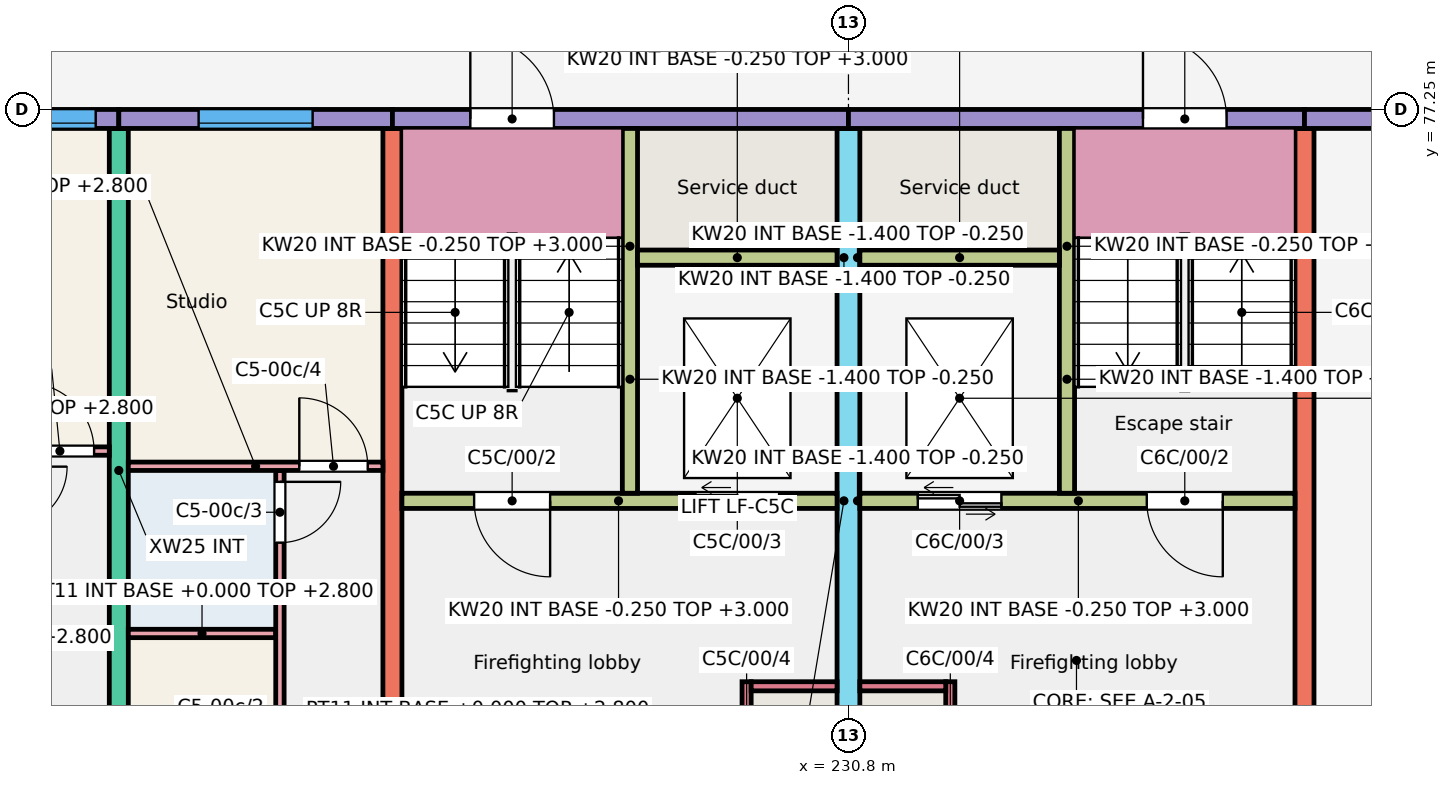
"""IFC4 building model, lengths in metres.
Left out: names, types, materials, properties, quantities, classifications, styles, units other than length and angle.
Written with IfcOpenShell. Run it as: python <this file> out.ifc"""

import sys

from ifc_helpers import new_model, si_unit, direction, frame, frame_2d, origin, place, context, subcontext, project, spatial, rectangle, extrude, element, fill, save


model = new_model("IFC4")
c1 = context("Model", 3, precision=1e-05, world=origin(), true_north=direction((0.0, 1.0)))
c2 = subcontext(c1, "Body", "Model", "MODEL_VIEW")
j1 = project(units=[si_unit("LENGTHUNIT", "METRE"), si_unit("PLANEANGLEUNIT", "RADIAN")], contexts=[c1])
p1 = place(None, origin())
s1 = spatial("IfcSite", under=j1, at=p1, CompositionType="ELEMENT")
p2 = place(p1, origin())
s2 = spatial("IfcBuilding", under=s1, at=p2, CompositionType="ELEMENT")
p3 = place(p2, origin())
s3 = spatial("IfcBuildingStorey", under=s2, at=p3, CompositionType="ELEMENT", Elevation=0.0)
for number, where, z_axis, x_axis in (
    (1, (221.2, 68.0, -0.25), (0.0, 0.0, 1.0), (0.0, 1.0, 0.0)),
    (2, (224.8, 68.0, -0.25), (0.0, 0.0, 1.0), (0.0, 1.0, 0.0)),
):
    element("IfcWall", number, at=place(p3, frame(where, z_axis=z_axis, x_axis=x_axis)), inside=s3, PredefinedType="SHEAR", context=c2, shape_type="SweptSolid", body=[
        extrude(rectangle(XDim=9.0, YDim=0.25, at=frame_2d((4.5, 0.0))), origin(), (0.0, 0.0, 1.0), 3.25),
    ])
p4 = place(p3, frame((230.8, 66.0, -0.25), z_axis=(0.0, 0.0, 1.0), x_axis=(0.0, 1.0, 0.0)))
e3 = element("IfcWall", 3, at=p4, inside=s3, PredefinedType="SHEAR", context=c2, shape_type="SweptSolid", body=[
    extrude(rectangle(XDim=11.0, YDim=0.3, at=frame_2d((5.5, 0.0))), origin(), (0.0, 0.0, 1.0), 3.25),
])
p5 = place(p4, frame((0.3, 0.0, 0.25)))
e4 = element("IfcOpeningElement", 4, at=p5, cuts=e3, PredefinedType="OPENING", context=c2, shape_type="SweptSolid", body=[
    extrude(rectangle(XDim=1.2, YDim=2.1, at=frame_2d((0.6, 1.05))), frame((0.0, 0.16, 0.0), z_axis=(0.0, -1.0, 0.0), x_axis=(1.0, 0.0, 0.0)), (0.0, 0.0, 1.0), 0.32),
])
p6 = place(p3, frame((236.8, 68.0, -0.25), z_axis=(0.0, 0.0, 1.0), x_axis=(0.0, 1.0, 0.0)))
e5 = element("IfcWall", 5, at=p6, inside=s3, PredefinedType="SHEAR", context=c2, shape_type="SweptSolid", body=[
    extrude(rectangle(XDim=9.0, YDim=0.25, at=frame_2d((4.5, 0.0))), origin(), (0.0, 0.0, 1.0), 3.25),
])
p7 = place(p3, frame((217.6, 77.125, -0.25), z_axis=(0.0, 0.0, 1.0), x_axis=(1.0, 0.0, 0.0)))
e6 = element("IfcWall", 6, at=p7, inside=s3, PredefinedType="SOLIDWALL", context=c2, shape_type="SweptSolid", body=[
    extrude(rectangle(XDim=3.6, YDim=0.25, at=frame_2d((1.8, 0.0))), origin(), (0.0, 0.0, 1.0), 3.25),
])
p8 = place(p7, frame((1.796, 0.0, 1.15)))
e7 = element("IfcOpeningElement", 7, at=p8, cuts=e6, PredefinedType="OPENING", context=c2, shape_type="SweptSolid", body=[
    extrude(rectangle(XDim=1.5, YDim=1.5, at=frame_2d((0.75, 0.75))), frame((0.0, 0.135, 0.0), z_axis=(0.0, -1.0, 0.0), x_axis=(1.0, 0.0, 0.0)), (0.0, 0.0, 1.0), 0.27),
])
p9 = place(p7, frame((0.517, 0.0, 0.25)))
e8 = element("IfcOpeningElement", 8, at=p9, cuts=e6, PredefinedType="OPENING", context=c2, shape_type="SweptSolid", body=[
    extrude(rectangle(XDim=1.0, YDim=2.1, at=frame_2d((0.5, 1.05))), frame((0.0, 0.135, 0.0), z_axis=(0.0, -1.0, 0.0), x_axis=(1.0, 0.0, 0.0)), (0.0, 0.0, 1.0), 0.27),
])
p10 = place(p3, frame((221.2, 77.125, -0.25), z_axis=(0.0, 0.0, 1.0), x_axis=(1.0, 0.0, 0.0)))
e9 = element("IfcWall", 9, at=p10, inside=s3, PredefinedType="SOLIDWALL", context=c2, shape_type="SweptSolid", body=[
    extrude(rectangle(XDim=3.6, YDim=0.25, at=frame_2d((1.8, 0.0))), origin(), (0.0, 0.0, 1.0), 3.25),
])
p11 = place(p10, frame((1.05, 0.0, 1.15)))
e10 = element("IfcOpeningElement", 10, at=p11, cuts=e9, PredefinedType="OPENING", context=c2, shape_type="SweptSolid", body=[
    extrude(rectangle(XDim=1.5, YDim=1.5, at=frame_2d((0.75, 0.75))), frame((0.0, 0.135, 0.0), z_axis=(0.0, -1.0, 0.0), x_axis=(1.0, 0.0, 0.0)), (0.0, 0.0, 1.0), 0.27),
])
p12 = place(p3, frame((224.8, 77.125, -0.25), z_axis=(0.0, 0.0, 1.0), x_axis=(1.0, 0.0, 0.0)))
e11 = element("IfcWall", 11, at=p12, inside=s3, PredefinedType="SOLIDWALL", context=c2, shape_type="SweptSolid", body=[
    extrude(rectangle(XDim=6.0, YDim=0.25, at=frame_2d((3.0, 0.0))), origin(), (0.0, 0.0, 1.0), 3.25),
])
p13 = place(p12, frame((1.025, 0.0, 0.25)))
e12 = element("IfcOpeningElement", 12, at=p13, cuts=e11, PredefinedType="OPENING", context=c2, shape_type="SweptSolid", body=[
    extrude(rectangle(XDim=1.1, YDim=2.1, at=frame_2d((0.55, 1.05))), frame((0.0, 0.135, 0.0), z_axis=(0.0, -1.0, 0.0), x_axis=(1.0, 0.0, 0.0)), (0.0, 0.0, 1.0), 0.27),
])
p14 = place(p3, frame((224.925, 72.1, -0.25), z_axis=(0.0, 0.0, 1.0), x_axis=(1.0, 0.0, 0.0)))
e13 = element("IfcWall", 13, at=p14, inside=s3, PredefinedType="SHEAR", context=c2, shape_type="SweptSolid", body=[
    extrude(rectangle(XDim=5.725, YDim=0.2, at=frame_2d((2.862, 0.0))), origin(), (0.0, 0.0, 1.0), 3.25),
])
p15 = place(p14, frame((0.95, 0.0, 0.25)))
e14 = element("IfcOpeningElement", 14, at=p15, cuts=e13, PredefinedType="OPENING", context=c2, shape_type="SweptSolid", body=[
    extrude(rectangle(XDim=1.0, YDim=2.1, at=frame_2d((0.5, 1.05))), frame((0.0, 0.11, 0.0), z_axis=(0.0, -1.0, 0.0), x_axis=(1.0, 0.0, 0.0)), (0.0, 0.0, 1.0), 0.22),
])
p16 = place(p14, frame((3.863, 0.0, 0.25)))
e15 = element("IfcOpeningElement", 15, at=p16, cuts=e13, PredefinedType="OPENING", context=c2, shape_type="SweptSolid", body=[
    extrude(rectangle(XDim=1.1, YDim=2.1, at=frame_2d((0.55, 1.05))), frame((0.0, 0.11, 0.0), z_axis=(0.0, -1.0, 0.0), x_axis=(1.0, 0.0, 0.0)), (0.0, 0.0, 1.0), 0.22),
])
p17 = place(p3, frame((227.925, 72.2, -0.25), z_axis=(0.0, 0.0, 1.0), x_axis=(0.0, 1.0, 0.0)))
e16 = element("IfcWall", 16, at=p17, inside=s3, PredefinedType="SHEAR", context=c2, shape_type="SweptSolid", body=[
    extrude(rectangle(XDim=4.8, YDim=0.2, at=frame_2d((2.4, 0.0))), origin(), (0.0, 0.0, 1.0), 3.25),
])
p18 = place(p3, frame((228.025, 75.3, -0.25), z_axis=(0.0, 0.0, 1.0), x_axis=(1.0, 0.0, 0.0)))
e17 = element("IfcWall", 17, at=p18, inside=s3, PredefinedType="SHEAR", context=c2, shape_type="SweptSolid", body=[
    extrude(rectangle(XDim=2.625, YDim=0.2, at=frame_2d((1.312, 0.0))), origin(), (0.0, 0.0, 1.0), 3.25),
])
p19 = place(p3, frame((229.46, 68.0, -0.25), z_axis=(0.0, 0.0, 1.0), x_axis=(0.0, 1.0, 0.0)))
e18 = element("IfcWall", 18, at=p19, inside=s3, PredefinedType="SHEAR", context=c2, shape_type="SweptSolid", body=[
    extrude(rectangle(XDim=1.72, YDim=0.12, at=frame_2d((0.86, 0.0))), origin(), (0.0, 0.0, 1.0), 3.25),
])
p20 = place(p19, frame((0.45, 0.0, 0.25)))
e19 = element("IfcOpeningElement", 19, at=p20, cuts=e18, PredefinedType="OPENING", context=c2, shape_type="SweptSolid", body=[
    extrude(rectangle(XDim=0.9, YDim=2.1, at=frame_2d((0.45, 1.05))), frame((0.0, 0.07, 0.0), z_axis=(0.0, -1.0, 0.0), x_axis=(1.0, 0.0, 0.0)), (0.0, 0.0, 1.0), 0.14),
])
p21 = place(p3, frame((229.52, 69.66, -0.25), z_axis=(0.0, 0.0, 1.0), x_axis=(1.0, 0.0, 0.0)))
e20 = element("IfcWall", 20, at=p21, inside=s3, PredefinedType="SHEAR", context=c2, shape_type="SweptSolid", body=[
    extrude(rectangle(XDim=1.13, YDim=0.12, at=frame_2d((0.565, 0.0))), origin(), (0.0, 0.0, 1.0), 3.25),
])
p22 = place(p3, frame((230.8, 77.125, -0.25), z_axis=(0.0, 0.0, 1.0), x_axis=(1.0, 0.0, 0.0)))
e21 = element("IfcWall", 21, at=p22, inside=s3, PredefinedType="SOLIDWALL", context=c2, shape_type="SweptSolid", body=[
    extrude(rectangle(XDim=6.0, YDim=0.25, at=frame_2d((3.0, 0.0))), origin(), (0.0, 0.0, 1.0), 3.25),
])
p23 = place(p22, frame((3.875, 0.0, 0.25)))
e22 = element("IfcOpeningElement", 22, at=p23, cuts=e21, PredefinedType="OPENING", context=c2, shape_type="SweptSolid", body=[
    extrude(rectangle(XDim=1.1, YDim=2.1, at=frame_2d((0.55, 1.05))), frame((0.0, 0.135, 0.0), z_axis=(0.0, -1.0, 0.0), x_axis=(1.0, 0.0, 0.0)), (0.0, 0.0, 1.0), 0.27),
])
p24 = place(p3, frame((230.95, 72.1, -0.25), z_axis=(0.0, 0.0, 1.0), x_axis=(1.0, 0.0, 0.0)))
e23 = element("IfcWall", 23, at=p24, inside=s3, PredefinedType="SHEAR", context=c2, shape_type="SweptSolid", body=[
    extrude(rectangle(XDim=5.725, YDim=0.2, at=frame_2d((2.863, 0.0))), origin(), (0.0, 0.0, 1.0), 3.25),
])
p25 = place(p24, frame((3.775, 0.0, 0.25)))
e24 = element("IfcOpeningElement", 24, at=p25, cuts=e23, PredefinedType="OPENING", context=c2, shape_type="SweptSolid", body=[
    extrude(rectangle(XDim=1.0, YDim=2.1, at=frame_2d((0.5, 1.05))), frame((0.0, 0.11, 0.0), z_axis=(0.0, -1.0, 0.0), x_axis=(1.0, 0.0, 0.0)), (0.0, 0.0, 1.0), 0.22),
])
p26 = place(p24, frame((0.762, 0.0, 0.25)))
e25 = element("IfcOpeningElement", 25, at=p26, cuts=e23, PredefinedType="OPENING", context=c2, shape_type="SweptSolid", body=[
    extrude(rectangle(XDim=1.1, YDim=2.1, at=frame_2d((0.55, 1.05))), frame((0.0, 0.11, 0.0), z_axis=(0.0, -1.0, 0.0), x_axis=(1.0, 0.0, 0.0)), (0.0, 0.0, 1.0), 0.22),
])
p27 = place(p3, frame((233.675, 72.2, -0.25), z_axis=(0.0, 0.0, 1.0), x_axis=(0.0, 1.0, 0.0)))
e26 = element("IfcWall", 26, at=p27, inside=s3, PredefinedType="SHEAR", context=c2, shape_type="SweptSolid", body=[
    extrude(rectangle(XDim=4.8, YDim=0.2, at=frame_2d((2.4, 0.0))), origin(), (0.0, 0.0, 1.0), 3.25),
])
p28 = place(p3, frame((230.95, 75.3, -0.25), z_axis=(0.0, 0.0, 1.0), x_axis=(1.0, 0.0, 0.0)))
e27 = element("IfcWall", 27, at=p28, inside=s3, PredefinedType="SHEAR", context=c2, shape_type="SweptSolid", body=[
    extrude(rectangle(XDim=2.625, YDim=0.2, at=frame_2d((1.312, 0.0))), origin(), (0.0, 0.0, 1.0), 3.25),
])
p29 = place(p3, frame((232.14, 68.0, -0.25), z_axis=(0.0, 0.0, 1.0), x_axis=(0.0, 1.0, 0.0)))
e28 = element("IfcWall", 28, at=p29, inside=s3, PredefinedType="SHEAR", context=c2, shape_type="SweptSolid", body=[
    extrude(rectangle(XDim=1.72, YDim=0.12, at=frame_2d((0.86, 0.0))), origin(), (0.0, 0.0, 1.0), 3.25),
])
p30 = place(p29, frame((0.45, 0.0, 0.25)))
e29 = element("IfcOpeningElement", 29, at=p30, cuts=e28, PredefinedType="OPENING", context=c2, shape_type="SweptSolid", body=[
    extrude(rectangle(XDim=0.9, YDim=2.1, at=frame_2d((0.45, 1.05))), frame((0.0, 0.07, 0.0), z_axis=(0.0, -1.0, 0.0), x_axis=(1.0, 0.0, 0.0)), (0.0, 0.0, 1.0), 0.14),
])
p31 = place(p3, frame((230.95, 69.66, -0.25), z_axis=(0.0, 0.0, 1.0), x_axis=(1.0, 0.0, 0.0)))
e30 = element("IfcWall", 30, at=p31, inside=s3, PredefinedType="SHEAR", context=c2, shape_type="SweptSolid", body=[
    extrude(rectangle(XDim=1.13, YDim=0.12, at=frame_2d((0.565, 0.0))), origin(), (0.0, 0.0, 1.0), 3.25),
])
p32 = place(p3, frame((236.8, 77.125, -0.25), z_axis=(0.0, 0.0, 1.0), x_axis=(1.0, 0.0, 0.0)))
e31 = element("IfcWall", 31, at=p32, inside=s3, PredefinedType="SOLIDWALL", context=c2, shape_type="SweptSolid", body=[
    extrude(rectangle(XDim=3.6, YDim=0.25, at=frame_2d((1.8, 0.0))), origin(), (0.0, 0.0, 1.0), 3.25),
])
p33 = place(p32, frame((1.3, 0.0, 0.25)))
e32 = element("IfcOpeningElement", 32, at=p33, cuts=e31, PredefinedType="OPENING", context=c2, shape_type="SweptSolid", body=[
    extrude(rectangle(XDim=1.0, YDim=2.1, at=frame_2d((0.5, 1.05))), frame((0.0, 0.135, 0.0), z_axis=(0.0, -1.0, 0.0), x_axis=(1.0, 0.0, 0.0)), (0.0, 0.0, 1.0), 0.27),
])
for number, where, z_axis, x_axis in (
    (33, (227.825, 72.1, -1.4), (0.0, 0.0, 1.0), (1.0, 0.0, 0.0)),
    (34, (227.825, 75.3, -1.4), (0.0, 0.0, 1.0), (1.0, 0.0, 0.0)),
):
    element("IfcWall", number, at=place(p3, frame(where, z_axis=z_axis, x_axis=x_axis)), inside=s3, PredefinedType="SHEAR", context=c2, shape_type="SweptSolid", body=[
        extrude(rectangle(XDim=2.975, YDim=0.2, at=frame_2d((1.488, 0.0))), origin(), (0.0, 0.0, 1.0), 1.15),
    ])
p34 = place(p3, frame((227.925, 72.2, -1.4), z_axis=(0.0, 0.0, 1.0), x_axis=(0.0, 1.0, 0.0)))
e35 = element("IfcWall", 35, at=p34, inside=s3, PredefinedType="SHEAR", context=c2, shape_type="SweptSolid", body=[
    extrude(rectangle(XDim=3.0, YDim=0.2, at=frame_2d((1.5, 0.0))), origin(), (0.0, 0.0, 1.0), 1.15),
])
p35 = place(p3, frame((230.725, 72.2, -1.4), z_axis=(0.0, 0.0, 1.0), x_axis=(0.0, 1.0, 0.0)))
e36 = element("IfcWall", 36, at=p35, inside=s3, PredefinedType="SHEAR", context=c2, shape_type="SweptSolid", body=[
    extrude(rectangle(XDim=3.0, YDim=0.15, at=frame_2d((1.5, 0.0))), origin(), (0.0, 0.0, 1.0), 1.15),
])
for number, where, z_axis, x_axis in (
    (37, (230.8, 72.1, -1.4), (0.0, 0.0, 1.0), (1.0, 0.0, 0.0)),
    (38, (230.8, 75.3, -1.4), (0.0, 0.0, 1.0), (1.0, 0.0, 0.0)),
):
    element("IfcWall", number, at=place(p3, frame(where, z_axis=z_axis, x_axis=x_axis)), inside=s3, PredefinedType="SHEAR", context=c2, shape_type="SweptSolid", body=[
        extrude(rectangle(XDim=2.975, YDim=0.2, at=frame_2d((1.487, 0.0))), origin(), (0.0, 0.0, 1.0), 1.15),
    ])
p36 = place(p3, frame((233.675, 72.2, -1.4), z_axis=(0.0, 0.0, 1.0), x_axis=(0.0, 1.0, 0.0)))
e39 = element("IfcWall", 39, at=p36, inside=s3, PredefinedType="SHEAR", context=c2, shape_type="SweptSolid", body=[
    extrude(rectangle(XDim=3.0, YDim=0.2, at=frame_2d((1.5, 0.0))), origin(), (0.0, 0.0, 1.0), 1.15),
])
p37 = place(p3, frame((230.875, 72.2, -1.4), z_axis=(0.0, 0.0, 1.0), x_axis=(0.0, 1.0, 0.0)))
e40 = element("IfcWall", 40, at=p37, inside=s3, PredefinedType="SHEAR", context=c2, shape_type="SweptSolid", body=[
    extrude(rectangle(XDim=3.0, YDim=0.15, at=frame_2d((1.5, 0.0))), origin(), (0.0, 0.0, 1.0), 1.15),
])
p38 = place(p3, frame((217.725, 72.755, 0.0), z_axis=(0.0, 0.0, 1.0), x_axis=(1.0, 0.0, 0.0)))
e41 = element("IfcWall", 41, at=p38, inside=s3, PredefinedType="PARTITIONING", context=c2, shape_type="SweptSolid", body=[
    extrude(rectangle(XDim=3.35, YDim=0.11, at=frame_2d((1.675, 0.0))), origin(), (0.0, 0.0, 1.0), 2.8),
])
p39 = place(p38, frame((2.25, 0.0, 0.0)))
e42 = element("IfcOpeningElement", 42, at=p39, cuts=e41, PredefinedType="OPENING", context=c2, shape_type="SweptSolid", body=[
    extrude(rectangle(XDim=0.9, YDim=2.1, at=frame_2d((0.45, 1.05))), frame((0.0, 0.065, 0.0), z_axis=(0.0, -1.0, 0.0), x_axis=(1.0, 0.0, 0.0)), (0.0, 0.0, 1.0), 0.13),
])
p40 = place(p3, frame((221.325, 70.355, 0.0), z_axis=(0.0, 0.0, 1.0), x_axis=(1.0, 0.0, 0.0)))
e43 = element("IfcWall", 43, at=p40, inside=s3, PredefinedType="PARTITIONING", context=c2, shape_type="SweptSolid", body=[
    extrude(rectangle(XDim=1.94, YDim=0.11, at=frame_2d((0.97, 0.0))), origin(), (0.0, 0.0, 1.0), 2.8),
])
p41 = place(p3, frame((223.32, 68.0, 0.0), z_axis=(0.0, 0.0, 1.0), x_axis=(0.0, 1.0, 0.0)))
e44 = element("IfcWall", 44, at=p41, inside=s3, PredefinedType="PARTITIONING", context=c2, shape_type="SweptSolid", body=[
    extrude(rectangle(XDim=4.5, YDim=0.11, at=frame_2d((2.25, 0.0))), origin(), (0.0, 0.0, 1.0), 2.8),
])
p42 = place(p41, frame((0.2, 0.0, 0.0)))
e45 = element("IfcOpeningElement", 45, at=p42, cuts=e44, PredefinedType="OPENING", context=c2, shape_type="SweptSolid", body=[
    extrude(rectangle(XDim=0.8, YDim=2.1, at=frame_2d((0.4, 1.05))), frame((0.0, 0.065, 0.0), z_axis=(0.0, -1.0, 0.0), x_axis=(1.0, 0.0, 0.0)), (0.0, 0.0, 1.0), 0.13),
])
p43 = place(p41, frame((3.55, 0.0, 0.0)))
e46 = element("IfcOpeningElement", 46, at=p43, cuts=e44, PredefinedType="OPENING", context=c2, shape_type="SweptSolid", body=[
    extrude(rectangle(XDim=0.8, YDim=2.1, at=frame_2d((0.4, 1.05))), frame((0.0, 0.065, 0.0), z_axis=(0.0, -1.0, 0.0), x_axis=(1.0, 0.0, 0.0)), (0.0, 0.0, 1.0), 0.13),
])
p44 = place(p3, frame((221.325, 72.555, 0.0), z_axis=(0.0, 0.0, 1.0), x_axis=(1.0, 0.0, 0.0)))
e47 = element("IfcWall", 47, at=p44, inside=s3, PredefinedType="PARTITIONING", context=c2, shape_type="SweptSolid", body=[
    extrude(rectangle(XDim=3.35, YDim=0.11, at=frame_2d((1.675, 0.0))), origin(), (0.0, 0.0, 1.0), 2.8),
])
p45 = place(p44, frame((2.25, 0.0, 0.0)))
e48 = element("IfcOpeningElement", 48, at=p45, cuts=e47, PredefinedType="OPENING", context=c2, shape_type="SweptSolid", body=[
    extrude(rectangle(XDim=0.9, YDim=2.1, at=frame_2d((0.45, 1.05))), frame((0.0, 0.065, 0.0), z_axis=(0.0, -1.0, 0.0), x_axis=(1.0, 0.0, 0.0)), (0.0, 0.0, 1.0), 0.13),
])
p46 = place(p8, origin())
e49 = element("IfcWindow", 49, at=p46, inside=s3, PartitioningType="SINGLE_PANEL", PredefinedType="WINDOW", context=c2, shape_type="SweptSolid", body=[
    extrude(rectangle(XDim=1.5, YDim=1.5, at=frame_2d((0.75, 0.75))), frame((0.0, -0.025, 0.0), z_axis=(0.0, -1.0, 0.0), x_axis=(1.0, 0.0, 0.0)), (0.0, 0.0, 1.0), 0.06),
])
fill(e7, e49)
p47 = place(p11, origin())
e50 = element("IfcWindow", 50, at=p47, inside=s3, PartitioningType="SINGLE_PANEL", PredefinedType="WINDOW", context=c2, shape_type="SweptSolid", body=[
    extrude(rectangle(XDim=1.5, YDim=1.5, at=frame_2d((0.75, 0.75))), frame((0.0, -0.025, 0.0), z_axis=(0.0, -1.0, 0.0), x_axis=(1.0, 0.0, 0.0)), (0.0, 0.0, 1.0), 0.06),
])
fill(e10, e50)
p48 = place(p39, origin())
e51 = element("IfcDoor", 51, at=p48, inside=s3, OperationType="SINGLE_SWING_LEFT", PredefinedType="DOOR", context=c2, shape_type="SweptSolid", body=[
    extrude(rectangle(XDim=0.9, YDim=2.1, at=frame_2d((0.45, 1.05))), frame((0.0, 0.025, 0.0), z_axis=(0.0, -1.0, 0.0), x_axis=(1.0, 0.0, 0.0)), (0.0, 0.0, 1.0), 0.05),
])
fill(e42, e51)
p49 = place(p43, origin())
e52 = element("IfcDoor", 52, at=p49, inside=s3, OperationType="SINGLE_SWING_RIGHT", PredefinedType="DOOR", context=c2, shape_type="SweptSolid", body=[
    extrude(rectangle(XDim=0.8, YDim=2.1, at=frame_2d((0.4, 1.05))), frame((0.0, 0.025, 0.0), z_axis=(0.0, -1.0, 0.0), x_axis=(1.0, 0.0, 0.0)), (0.0, 0.0, 1.0), 0.05),
])
fill(e46, e52)
p50 = place(p45, origin())
e53 = element("IfcDoor", 53, at=p50, inside=s3, OperationType="SINGLE_SWING_LEFT", PredefinedType="DOOR", context=c2, shape_type="SweptSolid", body=[
    extrude(rectangle(XDim=0.9, YDim=2.1, at=frame_2d((0.45, 1.05))), frame((0.0, 0.025, 0.0), z_axis=(0.0, -1.0, 0.0), x_axis=(1.0, 0.0, 0.0)), (0.0, 0.0, 1.0), 0.05),
])
fill(e48, e53)
p51 = place(p15, origin())
e54 = element("IfcDoor", 54, at=p51, inside=s3, OperationType="SINGLE_SWING_RIGHT", PredefinedType="DOOR", context=c2, shape_type="SweptSolid", body=[
    extrude(rectangle(XDim=1.0, YDim=2.1, at=frame_2d((0.5, 1.05))), frame((0.0, 0.025, 0.0), z_axis=(0.0, -1.0, 0.0), x_axis=(1.0, 0.0, 0.0)), (0.0, 0.0, 1.0), 0.05),
])
fill(e14, e54)
p52 = place(p16, origin())
e55 = element("IfcDoor", 55, at=p52, inside=s3, OperationType="DOUBLE_DOOR_SLIDING", PredefinedType="DOOR", context=c2, shape_type="SweptSolid", body=[
    extrude(rectangle(XDim=1.1, YDim=2.1, at=frame_2d((0.55, 1.05))), frame((0.0, 0.025, 0.0), z_axis=(0.0, -1.0, 0.0), x_axis=(1.0, 0.0, 0.0)), (0.0, 0.0, 1.0), 0.05),
])
fill(e15, e55)
p53 = place(p13, origin())
e56 = element("IfcDoor", 56, at=p53, inside=s3, OperationType="SINGLE_SWING_LEFT", PredefinedType="DOOR", context=c2, shape_type="SweptSolid", body=[
    extrude(rectangle(XDim=1.1, YDim=2.1, at=frame_2d((0.55, 1.05))), frame((0.0, 0.025, 0.0), z_axis=(0.0, -1.0, 0.0), x_axis=(1.0, 0.0, 0.0)), (0.0, 0.0, 1.0), 0.05),
])
fill(e12, e56)
p54 = place(p25, origin())
e57 = element("IfcDoor", 57, at=p54, inside=s3, OperationType="SINGLE_SWING_RIGHT", PredefinedType="DOOR", context=c2, shape_type="SweptSolid", body=[
    extrude(rectangle(XDim=1.0, YDim=2.1, at=frame_2d((0.5, 1.05))), frame((0.0, 0.025, 0.0), z_axis=(0.0, -1.0, 0.0), x_axis=(1.0, 0.0, 0.0)), (0.0, 0.0, 1.0), 0.05),
])
fill(e24, e57)
p55 = place(p26, origin())
e58 = element("IfcDoor", 58, at=p55, inside=s3, OperationType="DOUBLE_DOOR_SLIDING", PredefinedType="DOOR", context=c2, shape_type="SweptSolid", body=[
    extrude(rectangle(XDim=1.1, YDim=2.1, at=frame_2d((0.55, 1.05))), frame((0.0, 0.025, 0.0), z_axis=(0.0, -1.0, 0.0), x_axis=(1.0, 0.0, 0.0)), (0.0, 0.0, 1.0), 0.05),
])
fill(e25, e58)
p56 = place(p23, origin())
e59 = element("IfcDoor", 59, at=p56, inside=s3, OperationType="SINGLE_SWING_LEFT", PredefinedType="DOOR", context=c2, shape_type="SweptSolid", body=[
    extrude(rectangle(XDim=1.1, YDim=2.1, at=frame_2d((0.55, 1.05))), frame((0.0, 0.025, 0.0), z_axis=(0.0, -1.0, 0.0), x_axis=(1.0, 0.0, 0.0)), (0.0, 0.0, 1.0), 0.05),
])
fill(e22, e59)
save(model, sys.argv[1])
